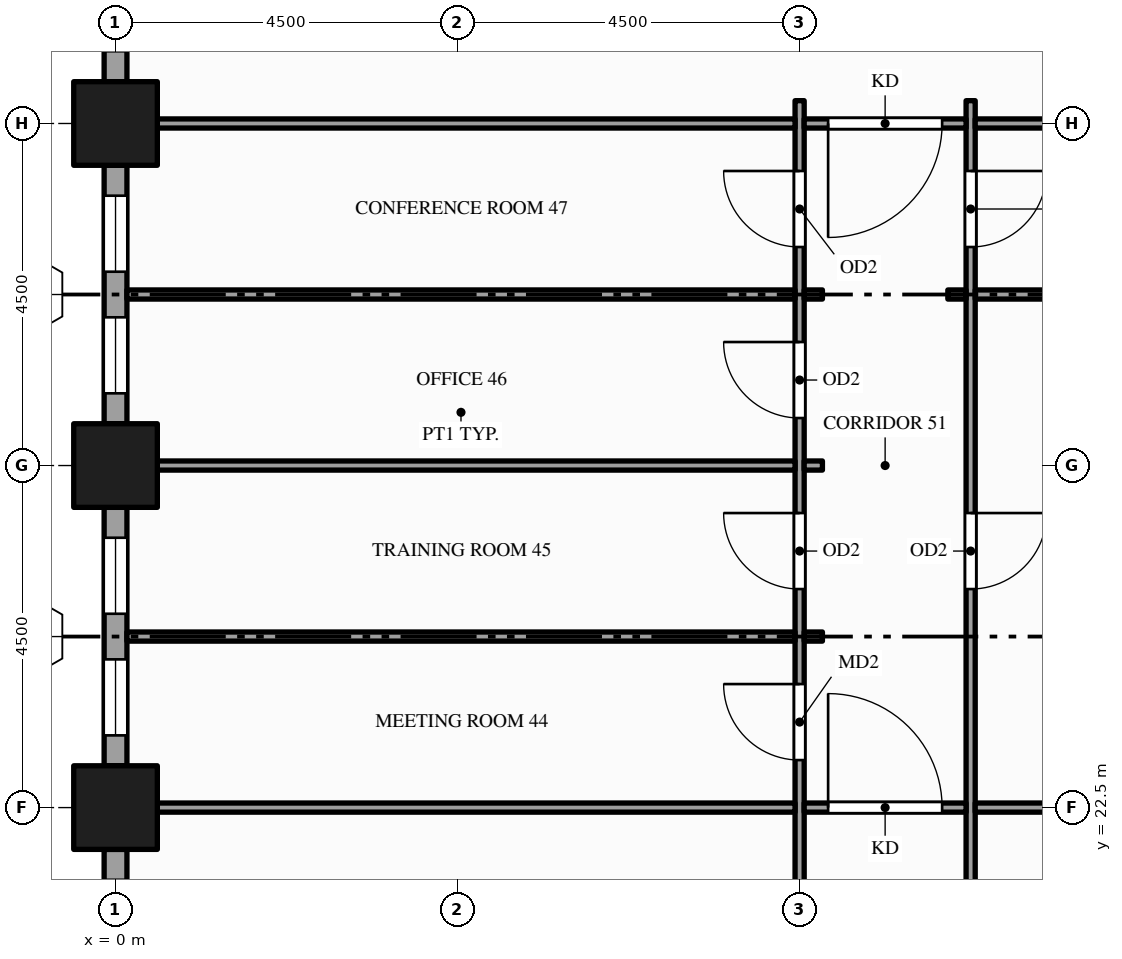
"""IFC4 building model, lengths in metres.
Left out: names, types, materials, properties, quantities, classifications, styles, units other than length and angle.
Written with IfcOpenShell. Run it as: python <this file> out.ifc"""

import sys

from ifc_helpers import new_model, si_unit, direction, frame, frame_2d, origin, origin_2d, place, context, subcontext, project, spatial, rectangle, hollow_rectangle, extrude, element, fill, save


model = new_model("IFC4")
c1 = context("Model", 3, precision=1e-05, world=origin(), true_north=direction((0.0, 1.0)))
c2 = subcontext(c1, "Body", "Model", "MODEL_VIEW")
j1 = project(units=[si_unit("LENGTHUNIT", "METRE"), si_unit("PLANEANGLEUNIT", "RADIAN")], contexts=[c1])
p1 = place(None, origin())
s1 = spatial("IfcSite", under=j1, at=p1, CompositionType="ELEMENT")
p2 = place(p1, origin())
s2 = spatial("IfcBuilding", under=s1, at=p2, CompositionType="ELEMENT")
p3 = place(p2, frame((0.0, 0.0, 14.0)))
s3 = spatial("IfcBuildingStorey", under=s2, at=p3, CompositionType="ELEMENT", Elevation=14.0)
for number, where, z_axis, x_axis in (
    (1, (0.0, 22.5, -0.25), (0.0, 0.0, 1.0), (1.0, 0.0, 0.0)),
    (2, (0.0, 27.0, -0.25), (0.0, 0.0, 1.0), (1.0, 0.0, 0.0)),
    (3, (0.0, 31.5, -0.25), (0.0, 0.0, 1.0), (1.0, 0.0, 0.0)),
):
    element("IfcColumn", number, at=place(p3, frame(where, z_axis=z_axis, x_axis=x_axis)), inside=s3, PredefinedType="COLUMN", context=c2, shape_type="SweptSolid", body=[
        extrude(hollow_rectangle(XDim=1.1, YDim=1.1, WallThickness=0.06, at=origin_2d()), origin(), (0.0, 0.0, 1.0), 5.0),
    ])
p4 = place(p3, frame((0.0, 35.999, 0.0), z_axis=(0.0, 0.0, 1.0), x_axis=(0.0, -1.0, 0.0)))
e4 = element("IfcWall", 4, at=p4, inside=s3, PredefinedType="STANDARD", context=c2, shape_type="SweptSolid", body=[
    extrude(rectangle(XDim=3.949, YDim=0.3, at=frame_2d((1.975, 0.0))), origin(), (0.0, 0.0, 1.0), 4.036),
])
p5 = place(p4, frame((0.425, 0.0, 0.9)))
e5 = element("IfcOpeningElement", 5, at=p5, cuts=e4, PredefinedType="OPENING", context=c2, shape_type="SweptSolid", body=[
    extrude(rectangle(XDim=1.5, YDim=2.75, at=frame_2d((0.75, 1.375))), frame((0.0, 0.16, 0.0), z_axis=(0.0, -1.0, 0.0), x_axis=(1.0, 0.0, 0.0)), (0.0, 0.0, 1.0), 0.32),
])
p6 = place(p4, frame((2.549, 0.0, 0.9)))
e6 = element("IfcOpeningElement", 6, at=p6, cuts=e4, PredefinedType="OPENING", context=c2, shape_type="SweptSolid", body=[
    extrude(rectangle(XDim=1.0, YDim=2.75, at=frame_2d((0.5, 1.375))), frame((0.0, 0.16, 0.0), z_axis=(0.0, -1.0, 0.0), x_axis=(1.0, 0.0, 0.0)), (0.0, 0.0, 1.0), 0.32),
])
p7 = place(p3, frame((0.0, 30.95, 0.0), z_axis=(0.0, 0.0, 1.0), x_axis=(0.0, -1.0, 0.0)))
e7 = element("IfcWall", 7, at=p7, inside=s3, PredefinedType="STANDARD", context=c2, shape_type="SweptSolid", body=[
    extrude(rectangle(XDim=3.4, YDim=0.3, at=frame_2d((1.7, 0.0))), origin(), (0.0, 0.0, 1.0), 4.036),
])
p8 = place(p7, frame((0.4, 0.0, 0.9)))
e8 = element("IfcOpeningElement", 8, at=p8, cuts=e7, PredefinedType="OPENING", context=c2, shape_type="SweptSolid", body=[
    extrude(rectangle(XDim=1.0, YDim=2.75, at=frame_2d((0.5, 1.375))), frame((0.0, 0.16, 0.0), z_axis=(0.0, -1.0, 0.0), x_axis=(1.0, 0.0, 0.0)), (0.0, 0.0, 1.0), 0.32),
])
p9 = place(p7, frame((2.0, 0.0, 0.9)))
e9 = element("IfcOpeningElement", 9, at=p9, cuts=e7, PredefinedType="OPENING", context=c2, shape_type="SweptSolid", body=[
    extrude(rectangle(XDim=1.0, YDim=2.75, at=frame_2d((0.5, 1.375))), frame((0.0, 0.16, 0.0), z_axis=(0.0, -1.0, 0.0), x_axis=(1.0, 0.0, 0.0)), (0.0, 0.0, 1.0), 0.32),
])
p10 = place(p3, frame((0.0, 26.45, 0.0), z_axis=(0.0, 0.0, 1.0), x_axis=(0.0, -1.0, 0.0)))
e10 = element("IfcWall", 10, at=p10, inside=s3, PredefinedType="STANDARD", context=c2, shape_type="SweptSolid", body=[
    extrude(rectangle(XDim=3.4, YDim=0.3, at=frame_2d((1.7, 0.0))), origin(), (0.0, 0.0, 1.0), 4.036),
])
p11 = place(p10, frame((0.4, 0.0, 0.9)))
e11 = element("IfcOpeningElement", 11, at=p11, cuts=e10, PredefinedType="OPENING", context=c2, shape_type="SweptSolid", body=[
    extrude(rectangle(XDim=1.0, YDim=2.75, at=frame_2d((0.5, 1.375))), frame((0.0, 0.16, 0.0), z_axis=(0.0, -1.0, 0.0), x_axis=(1.0, 0.0, 0.0)), (0.0, 0.0, 1.0), 0.32),
])
p12 = place(p10, frame((2.0, 0.0, 0.9)))
e12 = element("IfcOpeningElement", 12, at=p12, cuts=e10, PredefinedType="OPENING", context=c2, shape_type="SweptSolid", body=[
    extrude(rectangle(XDim=1.0, YDim=2.75, at=frame_2d((0.5, 1.375))), frame((0.0, 0.16, 0.0), z_axis=(0.0, -1.0, 0.0), x_axis=(1.0, 0.0, 0.0)), (0.0, 0.0, 1.0), 0.32),
])
p13 = place(p3, frame((0.0, 21.95, 0.0), z_axis=(0.0, 0.0, 1.0), x_axis=(0.0, -1.0, 0.0)))
e13 = element("IfcWall", 13, at=p13, inside=s3, PredefinedType="STANDARD", context=c2, shape_type="SweptSolid", body=[
    extrude(rectangle(XDim=3.4, YDim=0.3, at=frame_2d((1.7, 0.0))), origin(), (0.0, 0.0, 1.0), 4.036),
])
p14 = place(p13, frame((0.4, 0.0, 0.9)))
e14 = element("IfcOpeningElement", 14, at=p14, cuts=e13, PredefinedType="OPENING", context=c2, shape_type="SweptSolid", body=[
    extrude(rectangle(XDim=1.0, YDim=2.75, at=frame_2d((0.5, 1.375))), frame((0.0, 0.16, 0.0), z_axis=(0.0, -1.0, 0.0), x_axis=(1.0, 0.0, 0.0)), (0.0, 0.0, 1.0), 0.32),
])
p15 = place(p13, frame((2.0, 0.0, 0.9)))
e15 = element("IfcOpeningElement", 15, at=p15, cuts=e13, PredefinedType="OPENING", context=c2, shape_type="SweptSolid", body=[
    extrude(rectangle(XDim=1.0, YDim=2.75, at=frame_2d((0.5, 1.375))), frame((0.0, 0.16, 0.0), z_axis=(0.0, -1.0, 0.0), x_axis=(1.0, 0.0, 0.0)), (0.0, 0.0, 1.0), 0.32),
])
p16 = place(p3, frame((9.0, 10.95, 0.0), z_axis=(0.0, 0.0, 1.0), x_axis=(0.0, 1.0, 0.0)))
e16 = element("IfcWall", 16, at=p16, inside=s3, PredefinedType="PARTITIONING", context=c2, shape_type="SweptSolid", body=[
    extrude(rectangle(XDim=20.85, YDim=0.12, at=frame_2d((10.425, 0.0))), origin(), (0.0, 0.0, 1.0), 3.5),
])
p17 = place(p16, frame((12.175, 0.0, 0.0)))
e17 = element("IfcOpeningElement", 17, at=p17, cuts=e16, PredefinedType="OPENING", context=c2, shape_type="SweptSolid", body=[
    extrude(rectangle(XDim=1.0, YDim=2.1, at=frame_2d((0.5, 1.05))), frame((0.0, 0.07, 0.0), z_axis=(0.0, -1.0, 0.0), x_axis=(1.0, 0.0, 0.0)), (0.0, 0.0, 1.0), 0.14),
])
p18 = place(p16, frame((14.425, 0.0, 0.0)))
e18 = element("IfcOpeningElement", 18, at=p18, cuts=e16, PredefinedType="OPENING", context=c2, shape_type="SweptSolid", body=[
    extrude(rectangle(XDim=1.0, YDim=2.1, at=frame_2d((0.5, 1.05))), frame((0.0, 0.07, 0.0), z_axis=(0.0, -1.0, 0.0), x_axis=(1.0, 0.0, 0.0)), (0.0, 0.0, 1.0), 0.14),
])
p19 = place(p16, frame((16.675, 0.0, 0.0)))
e19 = element("IfcOpeningElement", 19, at=p19, cuts=e16, PredefinedType="OPENING", context=c2, shape_type="SweptSolid", body=[
    extrude(rectangle(XDim=1.0, YDim=2.1, at=frame_2d((0.5, 1.05))), frame((0.0, 0.07, 0.0), z_axis=(0.0, -1.0, 0.0), x_axis=(1.0, 0.0, 0.0)), (0.0, 0.0, 1.0), 0.14),
])
p20 = place(p16, frame((18.925, 0.0, 0.0)))
e20 = element("IfcOpeningElement", 20, at=p20, cuts=e16, PredefinedType="OPENING", context=c2, shape_type="SweptSolid", body=[
    extrude(rectangle(XDim=1.0, YDim=2.1, at=frame_2d((0.5, 1.05))), frame((0.0, 0.07, 0.0), z_axis=(0.0, -1.0, 0.0), x_axis=(1.0, 0.0, 0.0)), (0.0, 0.0, 1.0), 0.14),
])
p21 = place(p3, frame((11.25, 10.95, 0.0), z_axis=(0.0, 0.0, 1.0), x_axis=(0.0, 1.0, 0.0)))
e21 = element("IfcWall", 21, at=p21, inside=s3, PredefinedType="PARTITIONING", context=c2, shape_type="SweptSolid", body=[
    extrude(rectangle(XDim=20.85, YDim=0.12, at=frame_2d((10.425, 0.0))), origin(), (0.0, 0.0, 1.0), 3.5),
])
p22 = place(p21, frame((5.425, 0.0, 0.0)))
e22 = element("IfcOpeningElement", 22, at=p22, cuts=e21, PredefinedType="OPENING", context=c2, shape_type="SweptSolid", body=[
    extrude(rectangle(XDim=1.0, YDim=2.1, at=frame_2d((0.5, 1.05))), frame((0.0, 0.07, 0.0), z_axis=(0.0, -1.0, 0.0), x_axis=(1.0, 0.0, 0.0)), (0.0, 0.0, 1.0), 0.14),
])
p23 = place(p21, frame((14.425, 0.0, 0.0)))
e23 = element("IfcOpeningElement", 23, at=p23, cuts=e21, PredefinedType="OPENING", context=c2, shape_type="SweptSolid", body=[
    extrude(rectangle(XDim=1.0, YDim=2.1, at=frame_2d((0.5, 1.05))), frame((0.0, 0.07, 0.0), z_axis=(0.0, -1.0, 0.0), x_axis=(1.0, 0.0, 0.0)), (0.0, 0.0, 1.0), 0.14),
])
p24 = place(p21, frame((18.925, 0.0, 0.0)))
e24 = element("IfcOpeningElement", 24, at=p24, cuts=e21, PredefinedType="OPENING", context=c2, shape_type="SweptSolid", body=[
    extrude(rectangle(XDim=1.0, YDim=2.1, at=frame_2d((0.5, 1.05))), frame((0.0, 0.07, 0.0), z_axis=(0.0, -1.0, 0.0), x_axis=(1.0, 0.0, 0.0)), (0.0, 0.0, 1.0), 0.14),
])
p25 = place(p3, frame((0.15, 22.5, 0.0), z_axis=(0.0, 0.0, 1.0), x_axis=(1.0, 0.0, 0.0)))
e25 = element("IfcWall", 25, at=p25, inside=s3, PredefinedType="PARTITIONING", context=c2, shape_type="SweptSolid", body=[
    extrude(rectangle(XDim=8.79, YDim=0.12, at=frame_2d((4.395, 0.0))), origin(), (0.0, 0.0, 1.0), 3.5),
])
p26 = place(p3, frame((9.06, 22.5, 0.0), z_axis=(0.0, 0.0, 1.0), x_axis=(1.0, 0.0, 0.0)))
e26 = element("IfcWall", 26, at=p26, inside=s3, PredefinedType="PARTITIONING", context=c2, shape_type="SweptSolid", body=[
    extrude(rectangle(XDim=2.13, YDim=0.12, at=frame_2d((1.065, 0.0))), origin(), (0.0, 0.0, 1.0), 3.5),
])
p27 = place(p26, frame((0.315, 0.0, 0.0)))
e27 = element("IfcOpeningElement", 27, at=p27, cuts=e26, PredefinedType="OPENING", context=c2, shape_type="SweptSolid", body=[
    extrude(rectangle(XDim=1.5, YDim=2.1, at=frame_2d((0.75, 1.05))), frame((0.0, 0.07, 0.0), z_axis=(0.0, -1.0, 0.0), x_axis=(1.0, 0.0, 0.0)), (0.0, 0.0, 1.0), 0.14),
])
p28 = place(p3, frame((11.31, 22.5, 0.0), z_axis=(0.0, 0.0, 1.0), x_axis=(1.0, 0.0, 0.0)))
e28 = element("IfcWall", 28, at=p28, inside=s3, PredefinedType="PARTITIONING", context=c2, shape_type="SweptSolid", body=[
    extrude(rectangle(XDim=11.13, YDim=0.12, at=frame_2d((5.565, 0.0))), origin(), (0.0, 0.0, 1.0), 3.5),
])
p29 = place(p3, frame((0.15, 24.75, 0.0), z_axis=(0.0, 0.0, 1.0), x_axis=(1.0, 0.0, 0.0)))
e29 = element("IfcWall", 29, at=p29, inside=s3, PredefinedType="PARTITIONING", context=c2, shape_type="SweptSolid", body=[
    extrude(rectangle(XDim=8.79, YDim=0.12, at=frame_2d((4.395, 0.0))), origin(), (0.0, 0.0, 1.0), 3.759),
])
p30 = place(p3, frame((9.06, 24.75, 0.0), z_axis=(0.0, 0.0, 1.0), x_axis=(1.0, 0.0, 0.0)))
e30 = element("IfcWall", 30, at=p30, inside=s3, PredefinedType="PARTITIONING", context=c2, shape_type="SweptSolid", body=[
    extrude(rectangle(XDim=0.24, YDim=0.12, at=frame_2d((0.12, 0.0))), origin(), (0.0, 0.0, 1.0), 3.759),
])
p31 = place(p3, frame((0.15, 27.0, 0.0), z_axis=(0.0, 0.0, 1.0), x_axis=(1.0, 0.0, 0.0)))
e31 = element("IfcWall", 31, at=p31, inside=s3, PredefinedType="PARTITIONING", context=c2, shape_type="SweptSolid", body=[
    extrude(rectangle(XDim=8.79, YDim=0.12, at=frame_2d((4.395, 0.0))), origin(), (0.0, 0.0, 1.0), 3.759),
])
p32 = place(p3, frame((9.06, 27.0, 0.0), z_axis=(0.0, 0.0, 1.0), x_axis=(1.0, 0.0, 0.0)))
e32 = element("IfcWall", 32, at=p32, inside=s3, PredefinedType="PARTITIONING", context=c2, shape_type="SweptSolid", body=[
    extrude(rectangle(XDim=0.24, YDim=0.12, at=frame_2d((0.12, 0.0))), origin(), (0.0, 0.0, 1.0), 3.759),
])
p33 = place(p3, frame((0.15, 29.25, 0.0), z_axis=(0.0, 0.0, 1.0), x_axis=(1.0, 0.0, 0.0)))
e33 = element("IfcWall", 33, at=p33, inside=s3, PredefinedType="PARTITIONING", context=c2, shape_type="SweptSolid", body=[
    extrude(rectangle(XDim=8.79, YDim=0.12, at=frame_2d((4.395, 0.0))), origin(), (0.0, 0.0, 1.0), 3.759),
])
for number, where, z_axis, x_axis in (
    (34, (9.06, 29.25, 0.0), (0.0, 0.0, 1.0), (1.0, 0.0, 0.0)),
    (35, (10.95, 29.25, 0.0), (0.0, 0.0, 1.0), (1.0, 0.0, 0.0)),
):
    element("IfcWall", number, at=place(p3, frame(where, z_axis=z_axis, x_axis=x_axis)), inside=s3, PredefinedType="PARTITIONING", context=c2, shape_type="SweptSolid", body=[
        extrude(rectangle(XDim=0.24, YDim=0.12, at=frame_2d((0.12, 0.0))), origin(), (0.0, 0.0, 1.0), 3.759),
    ])
p34 = place(p3, frame((11.31, 29.25, 0.0), z_axis=(0.0, 0.0, 1.0), x_axis=(1.0, 0.0, 0.0)))
e36 = element("IfcWall", 36, at=p34, inside=s3, PredefinedType="PARTITIONING", context=c2, shape_type="SweptSolid", body=[
    extrude(rectangle(XDim=11.13, YDim=0.12, at=frame_2d((5.565, 0.0))), origin(), (0.0, 0.0, 1.0), 3.5),
])
p35 = place(p3, frame((0.15, 31.5, 0.0), z_axis=(0.0, 0.0, 1.0), x_axis=(1.0, 0.0, 0.0)))
e37 = element("IfcWall", 37, at=p35, inside=s3, PredefinedType="PARTITIONING", context=c2, shape_type="SweptSolid", body=[
    extrude(rectangle(XDim=8.79, YDim=0.12, at=frame_2d((4.395, 0.0))), origin(), (0.0, 0.0, 1.0), 3.759),
])
p36 = place(p3, frame((9.06, 31.5, 0.0), z_axis=(0.0, 0.0, 1.0), x_axis=(1.0, 0.0, 0.0)))
e38 = element("IfcWall", 38, at=p36, inside=s3, PredefinedType="PARTITIONING", context=c2, shape_type="SweptSolid", body=[
    extrude(rectangle(XDim=2.13, YDim=0.12, at=frame_2d((1.065, 0.0))), origin(), (0.0, 0.0, 1.0), 3.759),
])
p37 = place(p36, frame((0.315, 0.0, 0.0)))
e39 = element("IfcOpeningElement", 39, at=p37, cuts=e38, PredefinedType="OPENING", context=c2, shape_type="SweptSolid", body=[
    extrude(rectangle(XDim=1.5, YDim=2.1, at=frame_2d((0.75, 1.05))), frame((0.0, 0.07, 0.0), z_axis=(0.0, -1.0, 0.0), x_axis=(1.0, 0.0, 0.0)), (0.0, 0.0, 1.0), 0.14),
])
p38 = place(p3, frame((11.31, 31.5, 0.0), z_axis=(0.0, 0.0, 1.0), x_axis=(1.0, 0.0, 0.0)))
e40 = element("IfcWall", 40, at=p38, inside=s3, PredefinedType="PARTITIONING", context=c2, shape_type="SweptSolid", body=[
    extrude(rectangle(XDim=11.13, YDim=0.12, at=frame_2d((5.565, 0.0))), origin(), (0.0, 0.0, 1.0), 3.5),
])
p39 = place(p8, origin())
e41 = element("IfcWindow", 41, at=p39, inside=s3, PartitioningType="SINGLE_PANEL", PredefinedType="WINDOW", context=c2, shape_type="SweptSolid", body=[
    extrude(rectangle(XDim=1.0, YDim=2.75, at=frame_2d((0.5, 1.375))), frame((0.0, 0.03, 0.0), z_axis=(0.0, -1.0, 0.0), x_axis=(1.0, 0.0, 0.0)), (0.0, 0.0, 1.0), 0.06),
])
fill(e8, e41)
p40 = place(p9, origin())
e42 = element("IfcWindow", 42, at=p40, inside=s3, PartitioningType="SINGLE_PANEL", PredefinedType="WINDOW", context=c2, shape_type="SweptSolid", body=[
    extrude(rectangle(XDim=1.0, YDim=2.75, at=frame_2d((0.5, 1.375))), frame((0.0, 0.03, 0.0), z_axis=(0.0, -1.0, 0.0), x_axis=(1.0, 0.0, 0.0)), (0.0, 0.0, 1.0), 0.06),
])
fill(e9, e42)
p41 = place(p11, origin())
e43 = element("IfcWindow", 43, at=p41, inside=s3, PartitioningType="SINGLE_PANEL", PredefinedType="WINDOW", context=c2, shape_type="SweptSolid", body=[
    extrude(rectangle(XDim=1.0, YDim=2.75, at=frame_2d((0.5, 1.375))), frame((0.0, 0.03, 0.0), z_axis=(0.0, -1.0, 0.0), x_axis=(1.0, 0.0, 0.0)), (0.0, 0.0, 1.0), 0.06),
])
fill(e11, e43)
p42 = place(p12, origin())
e44 = element("IfcWindow", 44, at=p42, inside=s3, PartitioningType="SINGLE_PANEL", PredefinedType="WINDOW", context=c2, shape_type="SweptSolid", body=[
    extrude(rectangle(XDim=1.0, YDim=2.75, at=frame_2d((0.5, 1.375))), frame((0.0, 0.03, 0.0), z_axis=(0.0, -1.0, 0.0), x_axis=(1.0, 0.0, 0.0)), (0.0, 0.0, 1.0), 0.06),
])
fill(e12, e44)
p43 = place(p27, origin())
e45 = element("IfcDoor", 45, at=p43, inside=s3, OperationType="SINGLE_SWING_LEFT", PredefinedType="DOOR", context=c2, shape_type="SweptSolid", body=[
    extrude(rectangle(XDim=1.5, YDim=2.1, at=frame_2d((0.75, 1.05))), frame((0.0, 0.025, 0.0), z_axis=(0.0, -1.0, 0.0), x_axis=(1.0, 0.0, 0.0)), (0.0, 0.0, 1.0), 0.05),
])
fill(e27, e45)
p44 = place(p37, origin())
e46 = element("IfcDoor", 46, at=p44, inside=s3, OperationType="SINGLE_SWING_LEFT", PredefinedType="DOOR", context=c2, shape_type="SweptSolid", body=[
    extrude(rectangle(XDim=1.5, YDim=2.1, at=frame_2d((0.75, 1.05))), frame((0.0, 0.025, 0.0), z_axis=(0.0, -1.0, 0.0), x_axis=(1.0, 0.0, 0.0)), (0.0, 0.0, 1.0), 0.05),
])
fill(e39, e46)
p45 = place(p17, origin())
e47 = element("IfcDoor", 47, at=p45, inside=s3, OperationType="SINGLE_SWING_RIGHT", PredefinedType="DOOR", context=c2, shape_type="SweptSolid", body=[
    extrude(rectangle(XDim=1.0, YDim=2.1, at=frame_2d((0.5, 1.05))), frame((0.0, 0.025, 0.0), z_axis=(0.0, -1.0, 0.0), x_axis=(1.0, 0.0, 0.0)), (0.0, 0.0, 1.0), 0.05),
])
fill(e17, e47)
p46 = place(p18, origin())
e48 = element("IfcDoor", 48, at=p46, inside=s3, OperationType="SINGLE_SWING_RIGHT", PredefinedType="DOOR", context=c2, shape_type="SweptSolid", body=[
    extrude(rectangle(XDim=1.0, YDim=2.1, at=frame_2d((0.5, 1.05))), frame((0.0, 0.025, 0.0), z_axis=(0.0, -1.0, 0.0), x_axis=(1.0, 0.0, 0.0)), (0.0, 0.0, 1.0), 0.05),
])
fill(e18, e48)
p47 = place(p19, origin())
e49 = element("IfcDoor", 49, at=p47, inside=s3, OperationType="SINGLE_SWING_RIGHT", PredefinedType="DOOR", context=c2, shape_type="SweptSolid", body=[
    extrude(rectangle(XDim=1.0, YDim=2.1, at=frame_2d((0.5, 1.05))), frame((0.0, 0.025, 0.0), z_axis=(0.0, -1.0, 0.0), x_axis=(1.0, 0.0, 0.0)), (0.0, 0.0, 1.0), 0.05),
])
fill(e19, e49)
p48 = place(p20, origin())
e50 = element("IfcDoor", 50, at=p48, inside=s3, OperationType="SINGLE_SWING_RIGHT", PredefinedType="DOOR", context=c2, shape_type="SweptSolid", body=[
    extrude(rectangle(XDim=1.0, YDim=2.1, at=frame_2d((0.5, 1.05))), frame((0.0, 0.025, 0.0), z_axis=(0.0, -1.0, 0.0), x_axis=(1.0, 0.0, 0.0)), (0.0, 0.0, 1.0), 0.05),
])
fill(e20, e50)
p49 = place(p23, origin())
e51 = element("IfcDoor", 51, at=p49, inside=s3, OperationType="SINGLE_SWING_RIGHT", PredefinedType="DOOR", context=c2, shape_type="SweptSolid", body=[
    extrude(rectangle(XDim=1.0, YDim=2.1, at=frame_2d((0.5, 1.05))), frame((0.0, 0.025, 0.0), z_axis=(0.0, -1.0, 0.0), x_axis=(1.0, 0.0, 0.0)), (0.0, 0.0, 1.0), 0.05),
])
fill(e23, e51)
p50 = place(p24, origin())
e52 = element("IfcDoor", 52, at=p50, inside=s3, OperationType="SINGLE_SWING_RIGHT", PredefinedType="DOOR", context=c2, shape_type="SweptSolid", body=[
    extrude(rectangle(XDim=1.0, YDim=2.1, at=frame_2d((0.5, 1.05))), frame((0.0, 0.025, 0.0), z_axis=(0.0, -1.0, 0.0), x_axis=(1.0, 0.0, 0.0)), (0.0, 0.0, 1.0), 0.05),
])
fill(e24, e52)
save(model, sys.argv[1])
